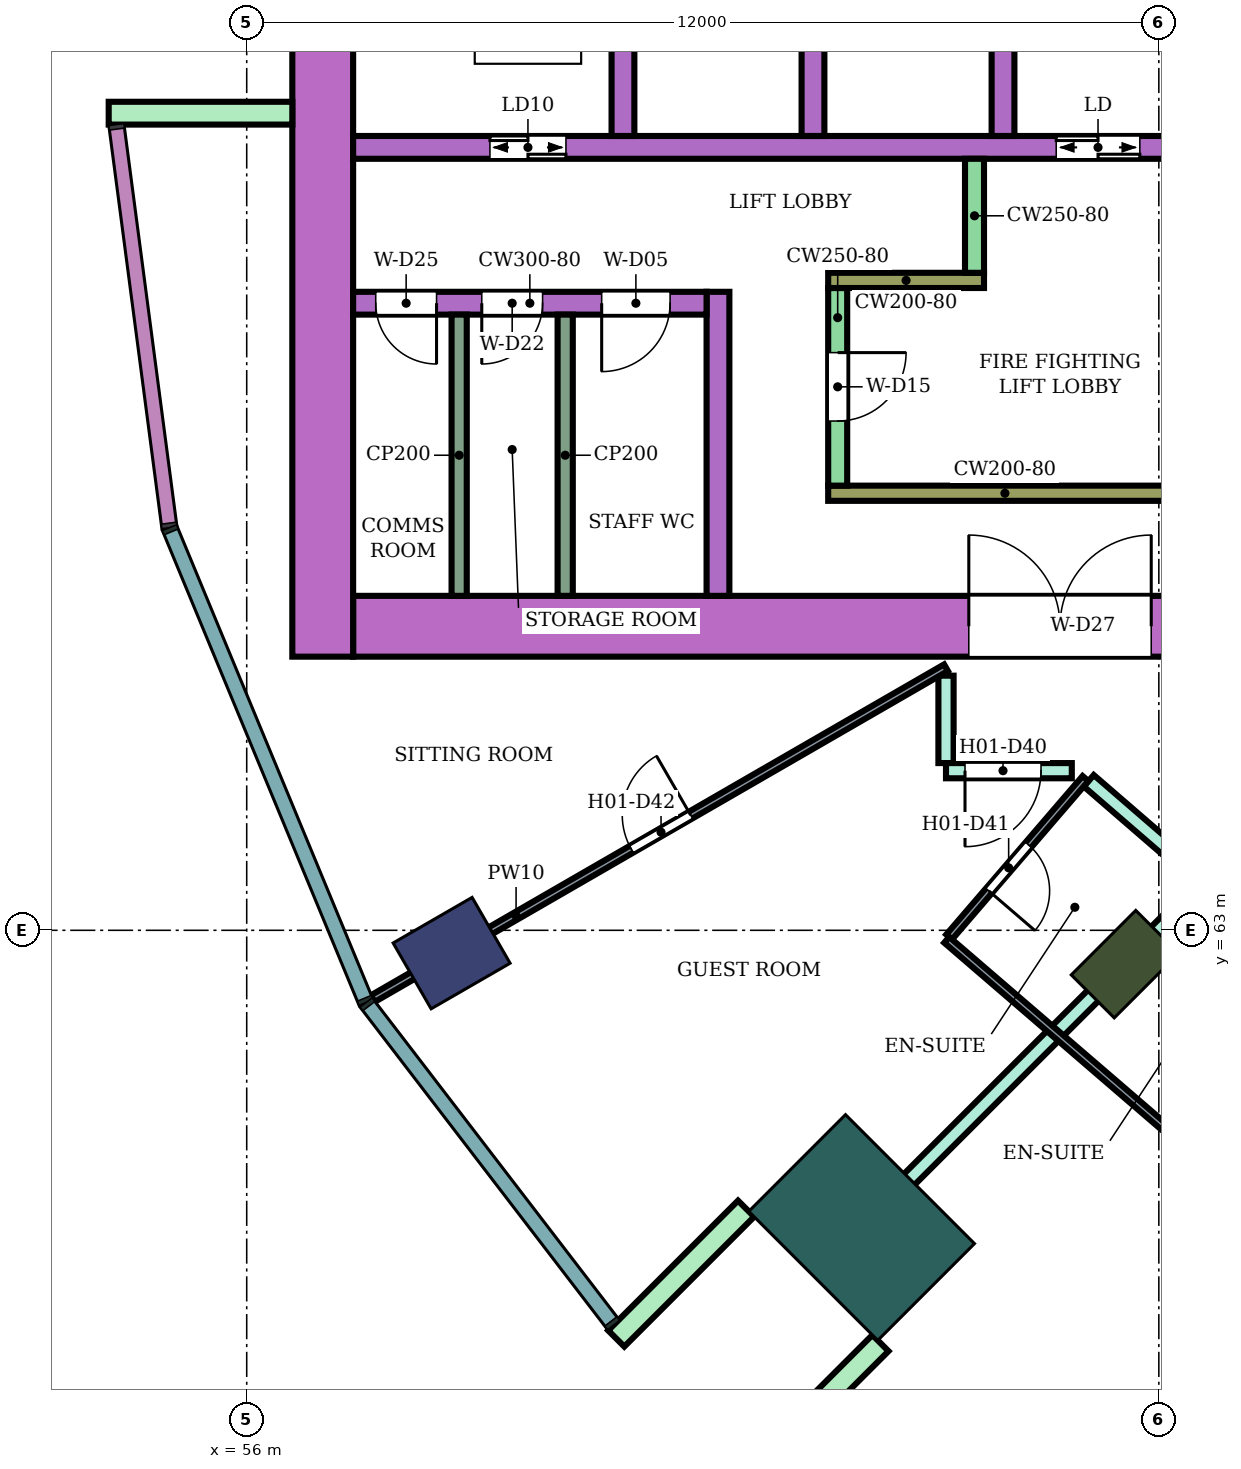
"""IFC4 building model, lengths in metres.
Left out: names, types, materials, properties, quantities, classifications, styles, units other than length and angle.
Written with IfcOpenShell. Run it as: python <this file> out.ifc"""

import sys

from ifc_helpers import new_model, si_unit, direction, frame, frame_2d, origin, origin_2d, place, context, subcontext, project, spatial, rectangle, extrude, element, fill, save


model = new_model("IFC4")
c1 = context("Model", 3, precision=1e-05, world=origin(), true_north=direction((0.0, 1.0)))
c2 = subcontext(c1, "Body", "Model", "MODEL_VIEW")
j1 = project(units=[si_unit("LENGTHUNIT", "METRE"), si_unit("PLANEANGLEUNIT", "RADIAN")], contexts=[c1])
p1 = place(None, origin())
s1 = spatial("IfcSite", under=j1, at=p1, CompositionType="ELEMENT")
p2 = place(p1, origin())
s2 = spatial("IfcBuilding", under=s1, at=p2, CompositionType="ELEMENT")
p3 = place(p2, frame((0.0, 0.0, 36.4)))
s3 = spatial("IfcBuildingStorey", under=s2, at=p3, CompositionType="ELEMENT", Elevation=36.4)
p4 = place(p3, frame((58.696, 62.7, 0.0), z_axis=(0.0, 0.0, 1.0), x_axis=(-0.866025403784, -0.5, 0.0)))
e1 = element("IfcColumn", 1, at=p4, inside=s3, PredefinedType="COLUMN", context=c2, shape_type="SweptSolid", body=[
    extrude(rectangle(XDim=1.2, YDim=1.0, at=origin_2d()), origin(), (0.0, 0.0, 1.0), 3.8),
])
p5 = place(p3, frame((67.555, 62.555, 0.0), z_axis=(0.0, 0.0, 1.0), x_axis=(-0.707106781187, -0.707106781187, 0.0)))
e2 = element("IfcColumn", 2, at=p5, inside=s3, PredefinedType="COLUMN", context=c2, shape_type="SweptSolid", body=[
    extrude(rectangle(XDim=1.2, YDim=0.8, at=origin_2d()), origin(), (0.0, 0.0, 1.0), 3.8),
])
p6 = place(p3, frame((64.09, 59.09, 0.0), z_axis=(0.0, 0.0, 1.0), x_axis=(-0.707106781187, -0.707106781187, 0.0)))
e3 = element("IfcColumn", 3, at=p6, inside=s3, PredefinedType="COLUMN", context=c2, shape_type="SweptSolid", body=[
    extrude(rectangle(XDim=1.8, YDim=2.4, at=origin_2d()), origin(), (0.0, 0.0, 1.0), 3.8),
])
p7 = place(p3, frame((72.1, 67.0, 0.0), z_axis=(0.0, 0.0, 1.0), x_axis=(-1.0, 0.0, 0.0)))
e4 = element("IfcWall", 4, at=p7, inside=s3, PredefinedType="SHEAR", context=c2, shape_type="SweptSolid", body=[
    extrude(rectangle(XDim=14.7, YDim=0.8, at=frame_2d((7.35, 0.0))), origin(), (0.0, 0.0, 1.0), 3.48),
])
p8 = place(p7, frame((4.2, 0.0, 0.0)))
e5 = element("IfcOpeningElement", 5, at=p8, cuts=e4, PredefinedType="OPENING", context=c2, shape_type="SweptSolid", body=[
    extrude(rectangle(XDim=2.4, YDim=2.4, at=frame_2d((1.2, 1.2))), frame((0.0, 0.41, 0.0), z_axis=(0.0, -1.0, 0.0), x_axis=(1.0, 0.0, 0.0)), (0.0, 0.0, 1.0), 0.82),
])
p9 = place(p3, frame((57.0, 83.4, 0.0), z_axis=(0.0, 0.0, 1.0), x_axis=(0.0, -1.0, 0.0)))
e6 = element("IfcWall", 6, at=p9, inside=s3, PredefinedType="SHEAR", context=c2, shape_type="SweptSolid", body=[
    extrude(rectangle(XDim=16.8, YDim=0.8, at=frame_2d((8.4, 0.0))), origin(), (0.0, 0.0, 1.0), 3.48),
])
p10 = place(p3, frame((68.3, 73.3, 0.0), z_axis=(0.0, 0.0, 1.0), x_axis=(-1.0, 0.0, 0.0)))
e7 = element("IfcWall", 7, at=p10, inside=s3, PredefinedType="SHEAR", context=c2, shape_type="SweptSolid", body=[
    extrude(rectangle(XDim=10.9, YDim=0.3, at=frame_2d((5.45, 0.0))), origin(), (0.0, 0.0, 1.0), 3.48),
])
p11 = place(p10, frame((0.55, 0.0, 0.0)))
e8 = element("IfcOpeningElement", 8, at=p11, cuts=e7, PredefinedType="OPENING", context=c2, shape_type="SweptSolid", body=[
    extrude(rectangle(XDim=1.1, YDim=2.1, at=frame_2d((0.55, 1.05))), frame((0.0, 0.16, 0.0), z_axis=(0.0, -1.0, 0.0), x_axis=(1.0, 0.0, 0.0)), (0.0, 0.0, 1.0), 0.32),
])
p12 = place(p10, frame((8.1, 0.0, 0.0)))
e9 = element("IfcOpeningElement", 9, at=p12, cuts=e7, PredefinedType="OPENING", context=c2, shape_type="SweptSolid", body=[
    extrude(rectangle(XDim=1.0, YDim=2.1, at=frame_2d((0.5, 1.05))), frame((0.0, 0.16, 0.0), z_axis=(0.0, -1.0, 0.0), x_axis=(1.0, 0.0, 0.0)), (0.0, 0.0, 1.0), 0.32),
])
for number, where, z_axis, x_axis in (
    (10, (65.95, 76.0, 0.0), (0.0, 0.0, 1.0), (0.0, -1.0, 0.0)),
    (11, (63.45, 76.0, 0.0), (0.0, 0.0, 1.0), (0.0, -1.0, 0.0)),
    (12, (60.95, 76.0, 0.0), (0.0, 0.0, 1.0), (0.0, -1.0, 0.0)),
):
    element("IfcWall", number, at=place(p3, frame(where, z_axis=z_axis, x_axis=x_axis)), inside=s3, PredefinedType="SHEAR", context=c2, shape_type="SweptSolid", body=[
        extrude(rectangle(XDim=2.55, YDim=0.3, at=frame_2d((1.275, 0.0))), origin(), (0.0, 0.0, 1.0), 3.48),
    ])
p13 = place(p3, frame((68.3, 68.75, 0.0), z_axis=(0.0, 0.0, 1.0), x_axis=(-1.0, 0.0, 0.0)))
e13 = element("IfcWall", 13, at=p13, inside=s3, PredefinedType="SHEAR", context=c2, shape_type="SweptSolid", body=[
    extrude(rectangle(XDim=4.65, YDim=0.2, at=frame_2d((2.325, 0.0))), origin(), (0.0, 0.0, 1.0), 3.48),
])
p14 = place(p3, frame((63.775, 71.45, 0.0), z_axis=(0.0, 0.0, 1.0), x_axis=(0.0, -1.0, 0.0)))
e14 = element("IfcWall", 14, at=p14, inside=s3, PredefinedType="SHEAR", context=c2, shape_type="SweptSolid", body=[
    extrude(rectangle(XDim=2.6, YDim=0.25, at=frame_2d((1.3, 0.0))), origin(), (0.0, 0.0, 1.0), 3.48),
])
p15 = place(p14, frame((0.85, 0.0, 0.0)))
e15 = element("IfcOpeningElement", 15, at=p15, cuts=e14, PredefinedType="OPENING", context=c2, shape_type="SweptSolid", body=[
    extrude(rectangle(XDim=0.9, YDim=2.1, at=frame_2d((0.45, 1.05))), frame((0.0, 0.135, 0.0), z_axis=(0.0, -1.0, 0.0), x_axis=(1.0, 0.0, 0.0)), (0.0, 0.0, 1.0), 0.27),
])
p16 = place(p3, frame((65.7, 71.55, 0.0), z_axis=(0.0, 0.0, 1.0), x_axis=(-1.0, 0.0, 0.0)))
e16 = element("IfcWall", 16, at=p16, inside=s3, PredefinedType="SHEAR", context=c2, shape_type="SweptSolid", body=[
    extrude(rectangle(XDim=2.05, YDim=0.2, at=frame_2d((1.025, 0.0))), origin(), (0.0, 0.0, 1.0), 3.48),
])
p17 = place(p3, frame((65.575, 73.15, 0.0), z_axis=(0.0, 0.0, 1.0), x_axis=(0.0, -1.0, 0.0)))
e17 = element("IfcWall", 17, at=p17, inside=s3, PredefinedType="SHEAR", context=c2, shape_type="SweptSolid", body=[
    extrude(rectangle(XDim=1.5, YDim=0.25, at=frame_2d((0.75, 0.0))), origin(), (0.0, 0.0, 1.0), 3.48),
])
p18 = place(p3, frame((62.2, 71.4, 0.0), z_axis=(0.0, 0.0, 1.0), x_axis=(0.0, -1.0, 0.0)))
e18 = element("IfcWall", 18, at=p18, inside=s3, PredefinedType="SHEAR", context=c2, shape_type="SweptSolid", body=[
    extrude(rectangle(XDim=4.0, YDim=0.3, at=frame_2d((2.0, 0.0))), origin(), (0.0, 0.0, 1.0), 3.48),
])
p19 = place(p3, frame((62.05, 71.25, 0.0), z_axis=(0.0, 0.0, 1.0), x_axis=(-1.0, 0.0, 0.0)))
e19 = element("IfcWall", 19, at=p19, inside=s3, PredefinedType="SHEAR", context=c2, shape_type="SweptSolid", body=[
    extrude(rectangle(XDim=4.65, YDim=0.3, at=frame_2d((2.325, 0.0))), origin(), (0.0, 0.0, 1.0), 3.48),
])
p20 = place(p19, frame((0.48, 0.0, 0.0)))
e20 = element("IfcOpeningElement", 20, at=p20, cuts=e19, PredefinedType="OPENING", context=c2, shape_type="SweptSolid", body=[
    extrude(rectangle(XDim=0.9, YDim=2.1, at=frame_2d((0.45, 1.05))), frame((0.0, 0.16, 0.0), z_axis=(0.0, -1.0, 0.0), x_axis=(1.0, 0.0, 0.0)), (0.0, 0.0, 1.0), 0.32),
])
p21 = place(p19, frame((2.157, 0.0, 0.0)))
e21 = element("IfcOpeningElement", 21, at=p21, cuts=e19, PredefinedType="OPENING", context=c2, shape_type="SweptSolid", body=[
    extrude(rectangle(XDim=0.8, YDim=2.1, at=frame_2d((0.4, 1.05))), frame((0.0, 0.16, 0.0), z_axis=(0.0, -1.0, 0.0), x_axis=(1.0, 0.0, 0.0)), (0.0, 0.0, 1.0), 0.32),
])
p22 = place(p19, frame((3.552, 0.0, 0.0)))
e22 = element("IfcOpeningElement", 22, at=p22, cuts=e19, PredefinedType="OPENING", context=c2, shape_type="SweptSolid", body=[
    extrude(rectangle(XDim=0.8, YDim=2.1, at=frame_2d((0.4, 1.05))), frame((0.0, 0.16, 0.0), z_axis=(0.0, -1.0, 0.0), x_axis=(1.0, 0.0, 0.0)), (0.0, 0.0, 1.0), 0.32),
])
for number, where, z_axis, x_axis in (
    (23, (56.6, 73.75, 0.0), (0.0, 0.0, 1.0), (-1.0, 0.0, 0.0)),
    (24, (62.57, 59.338, 0.0), (0.0, 0.0, 1.0), (-0.707, -0.707, 0.0)),
    (25, (64.338, 57.57, 0.0), (0.0, 0.0, 1.0), (-0.707, -0.707, 0.0)),
):
    element("IfcWall", number, at=place(p3, frame(where, z_axis=z_axis, x_axis=x_axis)), inside=s3, PredefinedType="NOTDEFINED", context=c2, shape_type="SweptSolid", body=[
        extrude(rectangle(XDim=2.416, YDim=0.3, at=frame_2d((1.208, 0.0))), origin(), (0.0, 0.0, 1.0), 3.8),
    ])
p23 = place(p3, frame((63.592, 58.599, 0.0), z_axis=(0.0, 0.0, 1.0), x_axis=(0.707228748718, 0.706984792613, 0.0)))
e26 = element("IfcWall", 26, at=p23, inside=s3, PredefinedType="PARTITIONING", context=c2, shape_type="SweptSolid", body=[
    extrude(rectangle(XDim=7.005, YDim=0.2, at=frame_2d((3.503, 0.0))), origin(), (0.0, 0.0, 1.0), 3.35),
])
p24 = place(p3, frame((65.2, 65.2, 0.0), z_axis=(0.0, 0.0, 1.0), x_axis=(0.0, 1.0, 0.0)))
e27 = element("IfcWall", 27, at=p24, inside=s3, PredefinedType="PARTITIONING", context=c2, shape_type="SweptSolid", body=[
    extrude(rectangle(XDim=1.15, YDim=0.2, at=frame_2d((0.575, 0.0))), origin(), (0.0, 0.0, 1.0), 3.35),
])
p25 = place(p3, frame((65.2, 65.1, 0.0), z_axis=(0.0, 0.0, 1.0), x_axis=(1.0, 0.0, 0.0)))
e28 = element("IfcWall", 28, at=p25, inside=s3, PredefinedType="PARTITIONING", context=c2, shape_type="SweptSolid", body=[
    extrude(rectangle(XDim=1.655, YDim=0.2, at=frame_2d((0.828, 0.0))), origin(), (0.0, 0.0, 1.0), 3.35),
])
p26 = place(p25, frame((0.25, 0.0, 0.0)))
e29 = element("IfcOpeningElement", 29, at=p26, cuts=e28, PredefinedType="OPENING", context=c2, shape_type="SweptSolid", body=[
    extrude(rectangle(XDim=1.0, YDim=2.1, at=frame_2d((0.5, 1.05))), frame((0.0, 0.11, 0.0), z_axis=(0.0, -1.0, 0.0), x_axis=(1.0, 0.0, 0.0)), (0.0, 0.0, 1.0), 0.22),
])
p27 = place(p3, frame((67.078, 64.968, 0.0), z_axis=(0.0, 0.0, 1.0), x_axis=(0.756371089567, -0.654142778656, 0.0)))
e30 = element("IfcWall", 30, at=p27, inside=s3, PredefinedType="PARTITIONING", context=c2, shape_type="SweptSolid", body=[
    extrude(rectangle(XDim=6.185, YDim=0.2, at=frame_2d((3.093, 0.0))), origin(), (0.0, 0.0, 1.0), 3.35),
])
p28 = place(p27, frame((4.755, 0.0, 0.0)))
e31 = element("IfcOpeningElement", 31, at=p28, cuts=e30, PredefinedType="OPENING", context=c2, shape_type="SweptSolid", body=[
    extrude(rectangle(XDim=1.0, YDim=2.1, at=frame_2d((0.5, 1.05))), frame((0.0, 0.11, 0.0), z_axis=(0.0, -1.0, 0.0), x_axis=(1.0, 0.0, 0.0)), (0.0, 0.0, 1.0), 0.22),
])
p29 = place(p3, frame((67.096, 52.662, 0.0), z_axis=(0.0, 0.0, 1.0), x_axis=(0.500242450002, 0.865885379953, 0.0)))
e32 = element("IfcWall", 32, at=p29, inside=s3, PredefinedType="PARTITIONING", context=c2, shape_type="SweptSolid", body=[
    extrude(rectangle(XDim=9.374, YDim=0.2, at=frame_2d((4.687, 0.0))), origin(), (0.0, 0.0, 1.0), 3.35),
])
p30 = place(p3, frame((57.659, 62.101, 0.0), z_axis=(0.0, 0.0, 1.0), x_axis=(0.86602264145, 0.500004784474, 0.0)))
e33 = element("IfcWall", 33, at=p30, inside=s3, PredefinedType="PARTITIONING", context=c2, shape_type="SweptSolid", body=[
    extrude(rectangle(XDim=8.708, YDim=0.1, at=frame_2d((4.354, 0.0))), origin(), (0.0, 0.0, 1.0), 3.35),
])
p31 = place(p30, frame((3.929, 0.0, 0.0)))
e34 = element("IfcOpeningElement", 34, at=p31, cuts=e33, PredefinedType="OPENING", context=c2, shape_type="SweptSolid", body=[
    extrude(rectangle(XDim=0.9, YDim=2.1, at=frame_2d((0.45, 1.05))), frame((0.0, 0.06, 0.0), z_axis=(0.0, -1.0, 0.0), x_axis=(1.0, 0.0, 0.0)), (0.0, 0.0, 1.0), 0.12),
])
p32 = place(p3, frame((65.242, 62.912, 0.0), z_axis=(0.0, 0.0, 1.0), x_axis=(0.652069888227, 0.758158862553, 0.0)))
e35 = element("IfcWall", 35, at=p32, inside=s3, PredefinedType="PARTITIONING", context=c2, shape_type="SweptSolid", body=[
    extrude(rectangle(XDim=2.75, YDim=0.1, at=frame_2d((1.375, 0.0))), origin(), (0.0, 0.0, 1.0), 3.35),
])
p33 = place(p32, frame((0.8, 0.0, 0.0)))
e36 = element("IfcOpeningElement", 36, at=p33, cuts=e35, PredefinedType="OPENING", context=c2, shape_type="SweptSolid", body=[
    extrude(rectangle(XDim=0.8, YDim=2.1, at=frame_2d((0.4, 1.05))), frame((0.0, 0.06, 0.0), z_axis=(0.0, -1.0, 0.0), x_axis=(1.0, 0.0, 0.0)), (0.0, 0.0, 1.0), 0.12),
])
p34 = place(p3, frame((65.209, 62.875, 0.0), z_axis=(0.0, 0.0, 1.0), x_axis=(0.757930378138, -0.652335451969, 0.0)))
e37 = element("IfcWall", 37, at=p34, inside=s3, PredefinedType="PARTITIONING", context=c2, shape_type="SweptSolid", body=[
    extrude(rectangle(XDim=4.15, YDim=0.1, at=frame_2d((2.075, 0.0))), origin(), (0.0, 0.0, 1.0), 3.35),
])
for number, where, z_axis, x_axis in (
    (38, (60.19, 71.1, 0.0), (0.0, 0.0, 1.0), (0.0, -1.0, 0.0)),
    (39, (58.795, 71.1, 0.0), (0.0, 0.0, 1.0), (0.0, -1.0, 0.0)),
):
    element("IfcWall", number, at=place(p3, frame(where, z_axis=z_axis, x_axis=x_axis)), inside=s3, PredefinedType="PARTITIONING", context=c2, shape_type="SweptSolid", body=[
        extrude(rectangle(XDim=3.7, YDim=0.2, at=frame_2d((1.85, 0.0))), origin(), (0.0, 0.0, 1.0), 3.48),
    ])
p35 = place(p26, frame((1.0, 0.0, 0.0), z_axis=(0.0, 0.0, 1.0), x_axis=(-1.0, 0.0, 0.0)))
e40 = element("IfcDoor", 40, at=p35, inside=s3, OperationType="SINGLE_SWING_RIGHT", PredefinedType="DOOR", context=c2, shape_type="SweptSolid", body=[
    extrude(rectangle(XDim=1.0, YDim=2.1, at=frame_2d((0.5, 1.05))), frame((0.0, 0.025, 0.0), z_axis=(0.0, -1.0, 0.0), x_axis=(1.0, 0.0, 0.0)), (0.0, 0.0, 1.0), 0.05),
])
fill(e29, e40)
p36 = place(p33, frame((0.8, 0.0, 0.0), z_axis=(0.0, 0.0, 1.0), x_axis=(-1.0, 0.0, 0.0)))
e41 = element("IfcDoor", 41, at=p36, inside=s3, OperationType="SINGLE_SWING_RIGHT", PredefinedType="DOOR", context=c2, shape_type="SweptSolid", body=[
    extrude(rectangle(XDim=0.8, YDim=2.1, at=frame_2d((0.4, 1.05))), frame((0.0, 0.025, 0.0), z_axis=(0.0, -1.0, 0.0), x_axis=(1.0, 0.0, 0.0)), (0.0, 0.0, 1.0), 0.05),
])
fill(e36, e41)
p37 = place(p31, origin())
e42 = element("IfcDoor", 42, at=p37, inside=s3, OperationType="SINGLE_SWING_RIGHT", PredefinedType="DOOR", context=c2, shape_type="SweptSolid", body=[
    extrude(rectangle(XDim=0.9, YDim=2.1, at=frame_2d((0.45, 1.05))), frame((0.0, 0.025, 0.0), z_axis=(0.0, -1.0, 0.0), x_axis=(1.0, 0.0, 0.0)), (0.0, 0.0, 1.0), 0.05),
])
fill(e34, e42)
p38 = place(p11, origin())
e43 = element("IfcDoor", 43, at=p38, inside=s3, OperationType="DOUBLE_DOOR_SLIDING", PredefinedType="DOOR", context=c2, shape_type="SweptSolid", body=[
    extrude(rectangle(XDim=1.1, YDim=2.1, at=frame_2d((0.55, 1.05))), frame((0.0, 0.025, 0.0), z_axis=(0.0, -1.0, 0.0), x_axis=(1.0, 0.0, 0.0)), (0.0, 0.0, 1.0), 0.05),
])
fill(e8, e43)
p39 = place(p12, origin())
e44 = element("IfcDoor", 44, at=p39, inside=s3, OperationType="DOUBLE_DOOR_SLIDING", PredefinedType="DOOR", context=c2, shape_type="SweptSolid", body=[
    extrude(rectangle(XDim=1.0, YDim=2.1, at=frame_2d((0.5, 1.05))), frame((0.0, 0.025, 0.0), z_axis=(0.0, -1.0, 0.0), x_axis=(1.0, 0.0, 0.0)), (0.0, 0.0, 1.0), 0.05),
])
fill(e9, e44)
p40 = place(p15, origin())
e45 = element("IfcDoor", 45, at=p40, inside=s3, OperationType="SINGLE_SWING_LEFT", PredefinedType="DOOR", context=c2, shape_type="SweptSolid", body=[
    extrude(rectangle(XDim=0.9, YDim=2.1, at=frame_2d((0.45, 1.05))), frame((0.0, 0.025, 0.0), z_axis=(0.0, -1.0, 0.0), x_axis=(1.0, 0.0, 0.0)), (0.0, 0.0, 1.0), 0.05),
])
fill(e15, e45)
p41 = place(p20, origin())
e46 = element("IfcDoor", 46, at=p41, inside=s3, OperationType="SINGLE_SWING_RIGHT", PredefinedType="DOOR", context=c2, shape_type="SweptSolid", body=[
    extrude(rectangle(XDim=0.9, YDim=2.1, at=frame_2d((0.45, 1.05))), frame((0.0, 0.025, 0.0), z_axis=(0.0, -1.0, 0.0), x_axis=(1.0, 0.0, 0.0)), (0.0, 0.0, 1.0), 0.05),
])
fill(e20, e46)
p42 = place(p21, origin())
e47 = element("IfcDoor", 47, at=p42, inside=s3, OperationType="SINGLE_SWING_RIGHT", PredefinedType="DOOR", context=c2, shape_type="SweptSolid", body=[
    extrude(rectangle(XDim=0.8, YDim=2.1, at=frame_2d((0.4, 1.05))), frame((0.0, 0.025, 0.0), z_axis=(0.0, -1.0, 0.0), x_axis=(1.0, 0.0, 0.0)), (0.0, 0.0, 1.0), 0.05),
])
fill(e21, e47)
p43 = place(p22, origin())
e48 = element("IfcDoor", 48, at=p43, inside=s3, OperationType="SINGLE_SWING_LEFT", PredefinedType="DOOR", context=c2, shape_type="SweptSolid", body=[
    extrude(rectangle(XDim=0.8, YDim=2.1, at=frame_2d((0.4, 1.05))), frame((0.0, 0.025, 0.0), z_axis=(0.0, -1.0, 0.0), x_axis=(1.0, 0.0, 0.0)), (0.0, 0.0, 1.0), 0.05),
])
fill(e22, e48)
p44 = place(p8, frame((2.4, 0.0, 0.0), z_axis=(0.0, 0.0, 1.0), x_axis=(-1.0, 0.0, 0.0)))
e49 = element("IfcDoor", 49, at=p44, inside=s3, OperationType="DOUBLE_DOOR_SINGLE_SWING", PredefinedType="DOOR", context=c2, shape_type="SweptSolid", body=[
    extrude(rectangle(XDim=2.4, YDim=2.4, at=frame_2d((1.2, 1.2))), frame((0.0, 0.025, 0.0), z_axis=(0.0, -1.0, 0.0), x_axis=(1.0, 0.0, 0.0)), (0.0, 0.0, 1.0), 0.05),
])
fill(e5, e49)
save(model, sys.argv[1])
